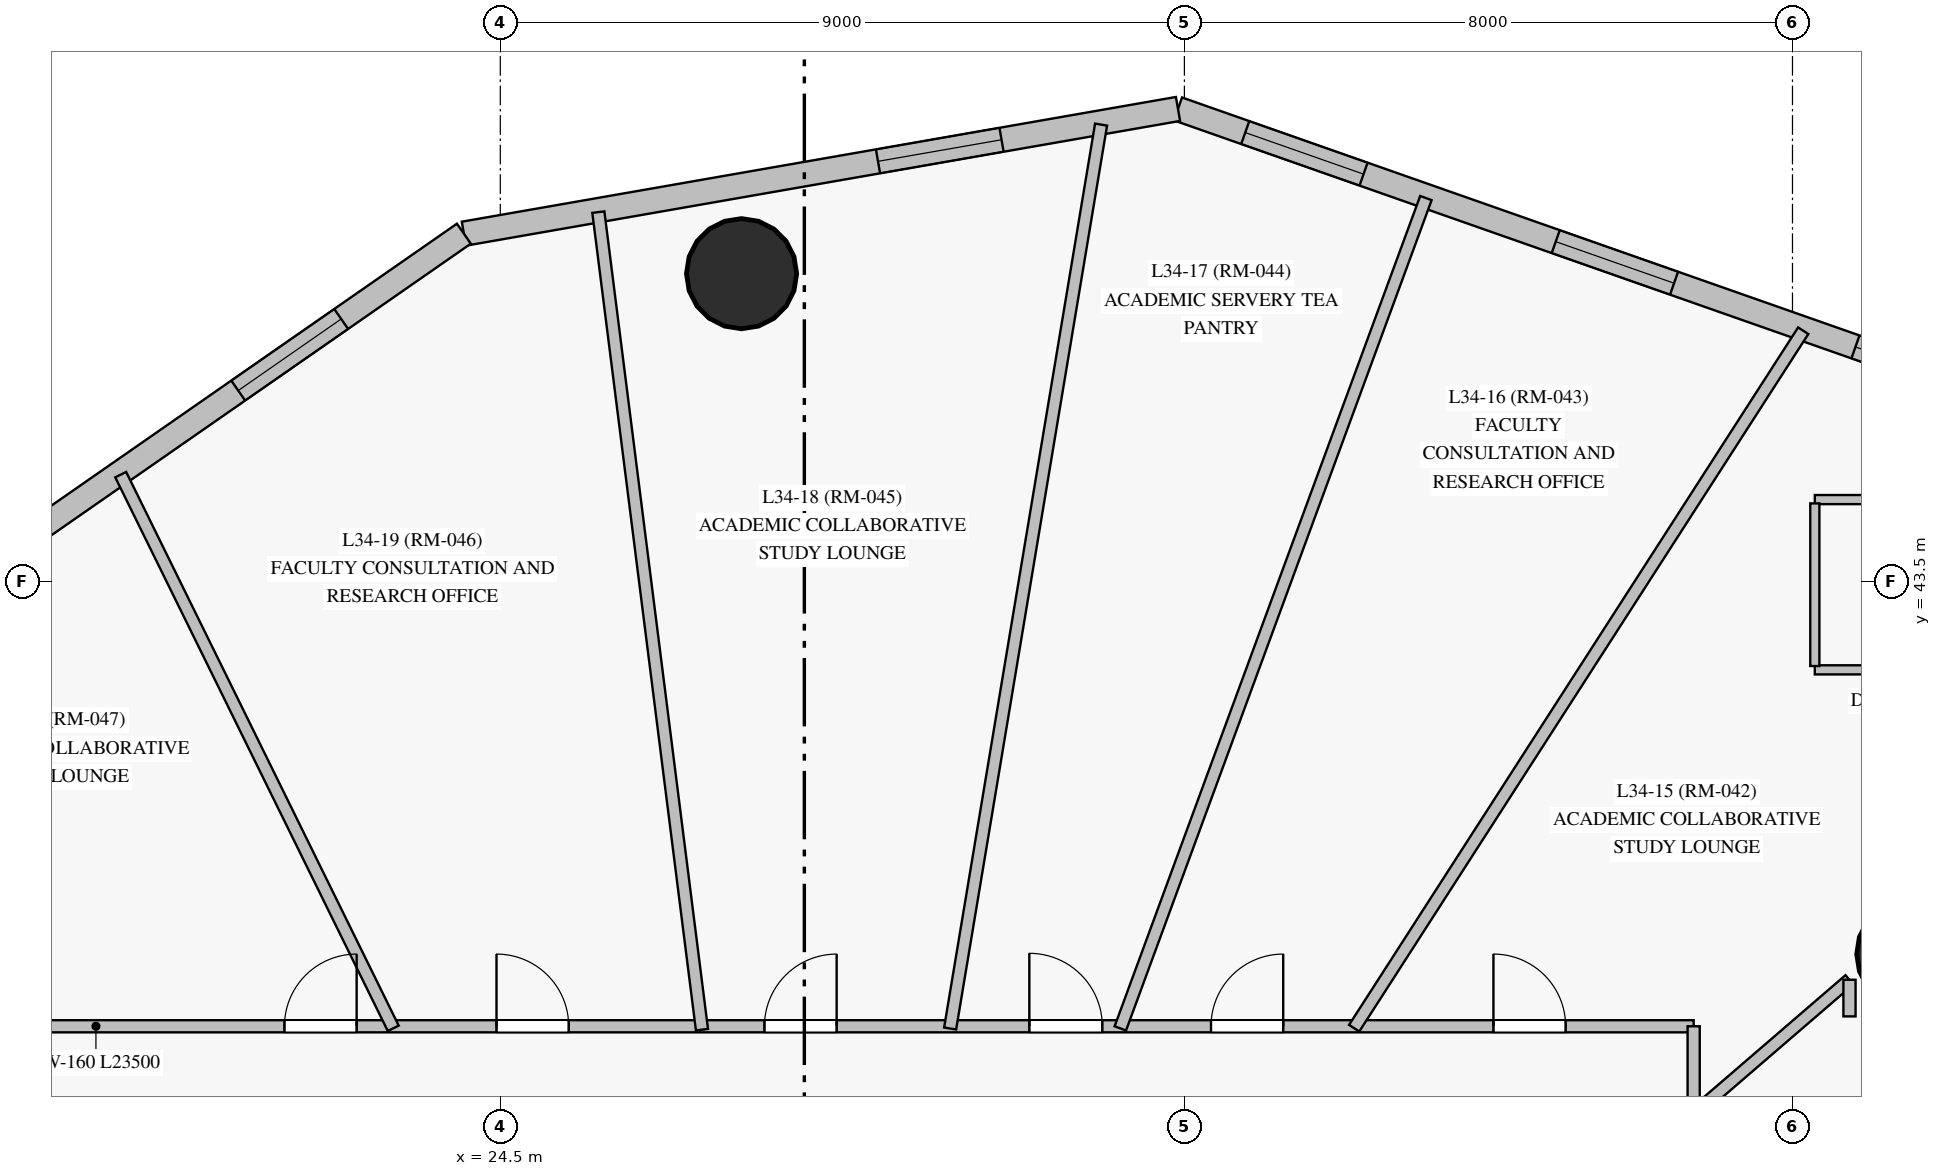
"""IFC4 building model, lengths in metres.
Left out: names, types, materials, properties, quantities, classifications, styles, units other than length and angle.
Written with IfcOpenShell. Run it as: python <this file> out.ifc"""

import sys

from ifc_helpers import new_model, si_unit, direction, frame, frame_2d, origin, origin_with_axes, origin_2d, place, context, subcontext, project, spatial, rectangle, circle, extrude, source, transform, mapped, element, fill, save


model = new_model("IFC4")
c1 = context("Model", 3, precision=1e-05, world=origin(), true_north=direction((0.0, 1.0)))
c2 = subcontext(c1, "Body", "Model", "MODEL_VIEW")
j1 = project(units=[si_unit("LENGTHUNIT", "METRE"), si_unit("PLANEANGLEUNIT", "RADIAN")], contexts=[c1])
p1 = place(None, origin())
s1 = spatial("IfcSite", under=j1, at=p1, CompositionType="ELEMENT")
p2 = place(p1, origin())
s2 = spatial("IfcBuilding", under=s1, at=p2, CompositionType="ELEMENT")
p3 = place(p2, frame((0.0, 0.0, 123.65)))
s3 = spatial("IfcBuildingStorey", under=s2, at=p3, CompositionType="ELEMENT", Elevation=123.65)
m1 = source(origin_with_axes(), c2, "Body", "SweptSolid", [
    extrude(circle(Radius=0.725, at=origin_2d()), origin(), (0.0, 0.0, 1.0), 3.05),
])
for number, where, z_axis, x_axis in (
    (1, (43.07, 38.6, 0.0), (0.0, 0.0, 1.0), (1.0, 0.0, 0.0)),
    (2, (27.674, 47.551, 0.0), (0.0, 0.0, 1.0), (1.0, 0.0, 0.0)),
):
    element("IfcColumn", number, at=place(p3, frame(where, z_axis=z_axis, x_axis=x_axis)), inside=s3, PredefinedType="COLUMN", context=c2, shape_type="MappedRepresentation", body=[
        mapped(m1, transform((0.0, 0.0, 0.0), scale=1.0)),
    ])
p4 = place(p3, frame((44.628, 45.78, 0.0), z_axis=(0.0, 0.0, 1.0), x_axis=(-0.943484621609, 0.331416307366, 0.0)))
e3 = element("IfcWall", 3, at=p4, inside=s3, PredefinedType="SOLIDWALL", context=c2, shape_type="SweptSolid", body=[
    extrude(rectangle(XDim=11.884, YDim=0.32, at=frame_2d((5.942, 0.0))), origin(), (0.0, 0.0, 1.0), 2.825),
])
p5 = place(p4, frame((0.787, 0.0, 0.85)))
e4 = element("IfcOpeningElement", 4, at=p5, cuts=e3, PredefinedType="OPENING", context=c2, shape_type="SweptSolid", body=[
    extrude(rectangle(XDim=1.65, YDim=1.65, at=frame_2d((0.825, 0.825))), frame((0.0, 0.17, 0.0), z_axis=(0.0, -1.0, 0.0), x_axis=(1.0, 0.0, 0.0)), (0.0, 0.0, 1.0), 0.34),
])
p6 = place(p4, frame((4.966, 0.0, 0.85)))
e5 = element("IfcOpeningElement", 5, at=p6, cuts=e3, PredefinedType="OPENING", context=c2, shape_type="SweptSolid", body=[
    extrude(rectangle(XDim=1.65, YDim=1.65, at=frame_2d((0.825, 0.825))), frame((0.0, 0.17, 0.0), z_axis=(0.0, -1.0, 0.0), x_axis=(1.0, 0.0, 0.0)), (0.0, 0.0, 1.0), 0.34),
])
p7 = place(p4, frame((9.296, 0.0, 0.85)))
e6 = element("IfcOpeningElement", 6, at=p7, cuts=e3, PredefinedType="OPENING", context=c2, shape_type="SweptSolid", body=[
    extrude(rectangle(XDim=1.65, YDim=1.65, at=frame_2d((0.825, 0.825))), frame((0.0, 0.17, 0.0), z_axis=(0.0, -1.0, 0.0), x_axis=(1.0, 0.0, 0.0)), (0.0, 0.0, 1.0), 0.34),
])
p8 = place(p3, frame((33.416, 49.718, 0.0), z_axis=(0.0, 0.0, 1.0), x_axis=(-0.985088439162, -0.172048734463, 0.0)))
e7 = element("IfcWall", 7, at=p8, inside=s3, PredefinedType="SOLIDWALL", context=c2, shape_type="SweptSolid", body=[
    extrude(rectangle(XDim=9.537, YDim=0.32, at=frame_2d((4.769, 0.0))), origin(), (0.0, 0.0, 1.0), 2.825),
])
p9 = place(p8, frame((2.356, 0.0, 0.85)))
e8 = element("IfcOpeningElement", 8, at=p9, cuts=e7, PredefinedType="OPENING", context=c2, shape_type="SweptSolid", body=[
    extrude(rectangle(XDim=1.65, YDim=1.65, at=frame_2d((0.825, 0.825))), frame((0.0, 0.17, 0.0), z_axis=(0.0, -1.0, 0.0), x_axis=(1.0, 0.0, 0.0)), (0.0, 0.0, 1.0), 0.34),
])
p10 = place(p3, frame((24.021, 48.077, 0.0), z_axis=(0.0, 0.0, 1.0), x_axis=(-0.821066763307, -0.570832173404, 0.0)))
e9 = element("IfcWall", 9, at=p10, inside=s3, PredefinedType="SOLIDWALL", context=c2, shape_type="SweptSolid", body=[
    extrude(rectangle(XDim=13.796, YDim=0.32, at=frame_2d((6.898, 0.0))), origin(), (0.0, 0.0, 1.0), 2.825),
])
p11 = place(p10, frame((1.966, 0.0, 0.85)))
e10 = element("IfcOpeningElement", 10, at=p11, cuts=e9, PredefinedType="OPENING", context=c2, shape_type="SweptSolid", body=[
    extrude(rectangle(XDim=1.65, YDim=1.65, at=frame_2d((0.825, 0.825))), frame((0.0, 0.17, 0.0), z_axis=(0.0, -1.0, 0.0), x_axis=(1.0, 0.0, 0.0)), (0.0, 0.0, 1.0), 0.34),
])
p12 = place(p10, frame((6.91, 0.0, 0.85)))
e11 = element("IfcOpeningElement", 11, at=p12, cuts=e9, PredefinedType="OPENING", context=c2, shape_type="SweptSolid", body=[
    extrude(rectangle(XDim=1.65, YDim=1.65, at=frame_2d((0.825, 0.825))), frame((0.0, 0.17, 0.0), z_axis=(0.0, -1.0, 0.0), x_axis=(1.0, 0.0, 0.0)), (0.0, 0.0, 1.0), 0.34),
])
p13 = place(p10, frame((10.697, 0.0, 0.85)))
e12 = element("IfcOpeningElement", 12, at=p13, cuts=e9, PredefinedType="OPENING", context=c2, shape_type="SweptSolid", body=[
    extrude(rectangle(XDim=1.65, YDim=1.65, at=frame_2d((0.825, 0.825))), frame((0.0, 0.17, 0.0), z_axis=(0.0, -1.0, 0.0), x_axis=(1.0, 0.0, 0.0)), (0.0, 0.0, 1.0), 0.34),
])
p14 = place(p3, frame((16.7, 37.65, 0.0), z_axis=(0.0, 0.0, 1.0), x_axis=(1.0, 0.0, 0.0)))
e13 = element("IfcWall", 13, at=p14, inside=s3, PredefinedType="PARTITIONING", context=c2, shape_type="SweptSolid", body=[
    extrude(rectangle(XDim=23.5, YDim=0.16, at=frame_2d((11.75, 0.0))), origin(), (0.0, 0.0, 1.0), 2.325),
])
p15 = place(p14, frame((20.866, 0.0, 0.0)))
e14 = element("IfcOpeningElement", 14, at=p15, cuts=e13, PredefinedType="OPENING", context=c2, shape_type="SweptSolid", body=[
    extrude(rectangle(XDim=0.95, YDim=2.15, at=frame_2d((0.475, 1.075))), frame((0.0, 0.09, 0.0), z_axis=(0.0, -1.0, 0.0), x_axis=(1.0, 0.0, 0.0)), (0.0, 0.0, 1.0), 0.18),
])
p16 = place(p14, frame((17.15, 0.0, 0.0)))
e15 = element("IfcOpeningElement", 15, at=p16, cuts=e13, PredefinedType="OPENING", context=c2, shape_type="SweptSolid", body=[
    extrude(rectangle(XDim=0.95, YDim=2.15, at=frame_2d((0.475, 1.075))), frame((0.0, 0.09, 0.0), z_axis=(0.0, -1.0, 0.0), x_axis=(1.0, 0.0, 0.0)), (0.0, 0.0, 1.0), 0.18),
])
p17 = place(p14, frame((14.76, 0.0, 0.0)))
e16 = element("IfcOpeningElement", 16, at=p17, cuts=e13, PredefinedType="OPENING", context=c2, shape_type="SweptSolid", body=[
    extrude(rectangle(XDim=0.96, YDim=2.15, at=frame_2d((0.48, 1.075))), frame((0.0, 0.09, 0.0), z_axis=(0.0, -1.0, 0.0), x_axis=(1.0, 0.0, 0.0)), (0.0, 0.0, 1.0), 0.18),
])
p18 = place(p14, frame((11.275, 0.0, 0.0)))
e17 = element("IfcOpeningElement", 17, at=p18, cuts=e13, PredefinedType="OPENING", context=c2, shape_type="SweptSolid", body=[
    extrude(rectangle(XDim=0.95, YDim=2.15, at=frame_2d((0.475, 1.075))), frame((0.0, 0.09, 0.0), z_axis=(0.0, -1.0, 0.0), x_axis=(1.0, 0.0, 0.0)), (0.0, 0.0, 1.0), 0.18),
])
p19 = place(p14, frame((7.75, 0.0, 0.0)))
e18 = element("IfcOpeningElement", 18, at=p19, cuts=e13, PredefinedType="OPENING", context=c2, shape_type="SweptSolid", body=[
    extrude(rectangle(XDim=0.95, YDim=2.15, at=frame_2d((0.475, 1.075))), frame((0.0, 0.09, 0.0), z_axis=(0.0, -1.0, 0.0), x_axis=(1.0, 0.0, 0.0)), (0.0, 0.0, 1.0), 0.18),
])
p20 = place(p14, frame((4.96, 0.0, 0.0)))
e19 = element("IfcOpeningElement", 19, at=p20, cuts=e13, PredefinedType="OPENING", context=c2, shape_type="SweptSolid", body=[
    extrude(rectangle(XDim=0.95, YDim=2.15, at=frame_2d((0.475, 1.075))), frame((0.0, 0.09, 0.0), z_axis=(0.0, -1.0, 0.0), x_axis=(1.0, 0.0, 0.0)), (0.0, 0.0, 1.0), 0.18),
])
p21 = place(p3, frame((40.2, 37.65, 0.0), z_axis=(0.0, 0.0, 1.0), x_axis=(0.0, -1.0, 0.0)))
e20 = element("IfcWall", 20, at=p21, inside=s3, PredefinedType="PARTITIONING", context=c2, shape_type="SweptSolid", body=[
    extrude(rectangle(XDim=22.3, YDim=0.16, at=frame_2d((11.15, 0.0))), origin(), (0.0, 0.0, 1.0), 2.325),
])
p22 = place(p21, frame((14.02, 0.0, 0.0)))
e21 = element("IfcOpeningElement", 21, at=p22, cuts=e20, PredefinedType="OPENING", context=c2, shape_type="SweptSolid", body=[
    extrude(rectangle(XDim=0.96, YDim=2.15, at=frame_2d((0.48, 1.075))), frame((0.0, 0.09, 0.0), z_axis=(0.0, -1.0, 0.0), x_axis=(1.0, 0.0, 0.0)), (0.0, 0.0, 1.0), 0.18),
])
p23 = place(p21, frame((10.675, 0.0, 0.0)))
e22 = element("IfcOpeningElement", 22, at=p23, cuts=e20, PredefinedType="OPENING", context=c2, shape_type="SweptSolid", body=[
    extrude(rectangle(XDim=0.96, YDim=2.15, at=frame_2d((0.48, 1.075))), frame((0.0, 0.09, 0.0), z_axis=(0.0, -1.0, 0.0), x_axis=(1.0, 0.0, 0.0)), (0.0, 0.0, 1.0), 0.18),
])
p24 = place(p21, frame((7.33, 0.0, 0.0)))
e23 = element("IfcOpeningElement", 23, at=p24, cuts=e20, PredefinedType="OPENING", context=c2, shape_type="SweptSolid", body=[
    extrude(rectangle(XDim=0.95, YDim=2.15, at=frame_2d((0.475, 1.075))), frame((0.0, 0.09, 0.0), z_axis=(0.0, -1.0, 0.0), x_axis=(1.0, 0.0, 0.0)), (0.0, 0.0, 1.0), 0.18),
])
p25 = place(p21, frame((4.91, 0.0, 0.0)))
e24 = element("IfcOpeningElement", 24, at=p25, cuts=e20, PredefinedType="OPENING", context=c2, shape_type="SweptSolid", body=[
    extrude(rectangle(XDim=0.95, YDim=2.15, at=frame_2d((0.475, 1.075))), frame((0.0, 0.09, 0.0), z_axis=(0.0, -1.0, 0.0), x_axis=(1.0, 0.0, 0.0)), (0.0, 0.0, 1.0), 0.18),
])
p26 = place(p3, frame((30.418, 37.62, 0.0), z_axis=(0.0, 0.0, 1.0), x_axis=(0.164710933683, 0.98634188207, 0.0)))
e25 = element("IfcWall", 25, at=p26, inside=s3, PredefinedType="PARTITIONING", context=c2, shape_type="SweptSolid", body=[
    extrude(rectangle(XDim=12.056, YDim=0.16, at=frame_2d((6.028, 0.0))), origin(), (0.0, 0.0, 1.0), 2.825),
])
p27 = place(p3, frame((32.657, 37.622, 0.0), z_axis=(0.0, 0.0, 1.0), x_axis=(0.345391402171, 0.938458725414, 0.0)))
e26 = element("IfcWall", 26, at=p27, inside=s3, PredefinedType="PARTITIONING", context=c2, shape_type="SweptSolid", body=[
    extrude(rectangle(XDim=11.64, YDim=0.16, at=frame_2d((5.82, 0.0))), origin(), (0.0, 0.0, 1.0), 2.825),
])
p28 = place(p3, frame((35.734, 37.625, 0.0), z_axis=(0.0, 0.0, 1.0), x_axis=(0.54132507633, 0.840813392933, 0.0)))
e27 = element("IfcWall", 27, at=p28, inside=s3, PredefinedType="PARTITIONING", context=c2, shape_type="SweptSolid", body=[
    extrude(rectangle(XDim=10.913, YDim=0.16, at=frame_2d((5.457, 0.0))), origin(), (0.0, 0.0, 1.0), 2.825),
])
p29 = place(p3, frame((27.153, 37.605, 0.0), z_axis=(0.0, 0.0, 1.0), x_axis=(-0.125744588112, 0.992062648506, 0.0)))
e28 = element("IfcWall", 28, at=p29, inside=s3, PredefinedType="PARTITIONING", context=c2, shape_type="SweptSolid", body=[
    extrude(rectangle(XDim=10.842, YDim=0.16, at=frame_2d((5.421, 0.0))), origin(), (0.0, 0.0, 1.0), 2.225),
])
p30 = place(p3, frame((23.092, 37.623, 0.0), z_axis=(0.0, 0.0, 1.0), x_axis=(-0.441623698669, 0.897200372701, 0.0)))
e29 = element("IfcWall", 29, at=p30, inside=s3, PredefinedType="PARTITIONING", context=c2, shape_type="SweptSolid", body=[
    extrude(rectangle(XDim=8.119, YDim=0.16, at=frame_2d((4.06, 0.0))), origin(), (0.0, 0.0, 1.0), 2.825),
])
p31 = place(p3, frame((40.177, 36.477, 0.0), z_axis=(0.0, 0.0, 1.0), x_axis=(0.757761446907, 0.652531677071, 0.0)))
e30 = element("IfcWall", 30, at=p31, inside=s3, PredefinedType="PARTITIONING", context=c2, shape_type="SweptSolid", body=[
    extrude(rectangle(XDim=2.735, YDim=0.16, at=frame_2d((1.368, 0.0))), origin(), (0.0, 0.0, 1.0), 2.225),
])
p32 = place(p3, frame((41.794, 42.339, 0.0), z_axis=(0.0, 0.0, 1.0), x_axis=(1.0, 0.0, 0.0)))
e31 = element("IfcWall", 31, at=p32, inside=s3, PredefinedType="PARTITIONING", context=c2, shape_type="SweptSolid", body=[
    extrude(rectangle(XDim=2.36, YDim=0.12, at=frame_2d((1.18, 0.0))), origin(), (0.0, 0.0, 1.0), 2.825),
])
p33 = place(p32, frame((0.75, 0.0, 0.0)))
e32 = element("IfcOpeningElement", 32, at=p33, cuts=e31, PredefinedType="OPENING", context=c2, shape_type="SweptSolid", body=[
    extrude(rectangle(XDim=0.86, YDim=2.1, at=frame_2d((0.43, 1.05))), frame((0.0, 0.07, 0.0), z_axis=(0.0, -1.0, 0.0), x_axis=(1.0, 0.0, 0.0)), (0.0, 0.0, 1.0), 0.14),
])
p34 = place(p3, frame((44.154, 44.579, 0.0), z_axis=(0.0, 0.0, 1.0), x_axis=(-1.0, 0.0, 0.0)))
e33 = element("IfcWall", 33, at=p34, inside=s3, PredefinedType="PARTITIONING", context=c2, shape_type="SweptSolid", body=[
    extrude(rectangle(XDim=2.36, YDim=0.12, at=frame_2d((1.18, 0.0))), origin(), (0.0, 0.0, 1.0), 2.825),
])
p35 = place(p3, frame((41.794, 44.529, 0.0), z_axis=(0.0, 0.0, 1.0), x_axis=(0.0, -1.0, 0.0)))
e34 = element("IfcWall", 34, at=p35, inside=s3, PredefinedType="PARTITIONING", context=c2, shape_type="SweptSolid", body=[
    extrude(rectangle(XDim=2.14, YDim=0.12, at=frame_2d((1.07, 0.0))), origin(), (0.0, 0.0, 1.0), 2.825),
])
p36 = place(p3, frame((42.25, 38.262, 0.0), z_axis=(0.0, 0.0, 1.0), x_axis=(0.0, -1.0, 0.0)))
e35 = element("IfcWall", 35, at=p36, inside=s3, PredefinedType="PARTITIONING", context=c2, shape_type="SweptSolid", body=[
    extrude(rectangle(XDim=0.482, YDim=0.16, at=frame_2d((0.241, 0.0))), origin(), (0.0, 0.0, 1.0), 2.325),
])
m2 = source(origin_with_axes(), c2, "Body", "SweptSolid", [
    extrude(rectangle(XDim=1.65, YDim=1.65, at=frame_2d((0.825, 0.825))), frame((0.0, 0.03, 0.0), z_axis=(0.0, -1.0, 0.0), x_axis=(1.0, 0.0, 0.0)), (0.0, 0.0, 1.0), 0.06),
])
p37 = place(p5, origin())
e36 = element("IfcWindow", 36, at=p37, inside=s3, PartitioningType="SINGLE_PANEL", PredefinedType="WINDOW", context=c2, shape_type="MappedRepresentation", body=[
    mapped(m2, transform((0.0, 0.0, 0.0), scale=1.0)),
])
fill(e4, e36)
p38 = place(p6, origin())
e37 = element("IfcWindow", 37, at=p38, inside=s3, PartitioningType="SINGLE_PANEL", PredefinedType="WINDOW", context=c2, shape_type="MappedRepresentation", body=[
    mapped(m2, transform((0.0, 0.0, 0.0), scale=1.0)),
])
fill(e5, e37)
p39 = place(p7, origin())
e38 = element("IfcWindow", 38, at=p39, inside=s3, PartitioningType="SINGLE_PANEL", PredefinedType="WINDOW", context=c2, shape_type="MappedRepresentation", body=[
    mapped(m2, transform((0.0, 0.0, 0.0), scale=1.0)),
])
fill(e6, e38)
p40 = place(p9, origin())
e39 = element("IfcWindow", 39, at=p40, inside=s3, PartitioningType="SINGLE_PANEL", PredefinedType="WINDOW", context=c2, shape_type="MappedRepresentation", body=[
    mapped(m2, transform((0.0, 0.0, 0.0), scale=1.0)),
])
fill(e8, e39)
p41 = place(p11, origin())
e40 = element("IfcWindow", 40, at=p41, inside=s3, PartitioningType="SINGLE_PANEL", PredefinedType="WINDOW", context=c2, shape_type="MappedRepresentation", body=[
    mapped(m2, transform((0.0, 0.0, 0.0), scale=1.0)),
])
fill(e10, e40)
m3 = source(origin_with_axes(), c2, "Body", "SweptSolid", [
    extrude(rectangle(XDim=0.95, YDim=2.15, at=frame_2d((0.475, 1.075))), frame((0.0, 0.025, 0.0), z_axis=(0.0, -1.0, 0.0), x_axis=(1.0, 0.0, 0.0)), (0.0, 0.0, 1.0), 0.05),
])
p42 = place(p15, origin())
e41 = element("IfcDoor", 41, at=p42, inside=s3, OperationType="SINGLE_SWING_LEFT", PredefinedType="DOOR", context=c2, shape_type="MappedRepresentation", body=[
    mapped(m3, transform((0.0, 0.0, 0.0), scale=1.0)),
])
fill(e14, e41)
p43 = place(p16, origin())
e42 = element("IfcDoor", 42, at=p43, inside=s3, OperationType="SINGLE_SWING_RIGHT", PredefinedType="DOOR", context=c2, shape_type="MappedRepresentation", body=[
    mapped(m3, transform((0.0, 0.0, 0.0), scale=1.0)),
])
fill(e15, e42)
m4 = source(origin_with_axes(), c2, "Body", "SweptSolid", [
    extrude(rectangle(XDim=0.96, YDim=2.15, at=frame_2d((0.48, 1.075))), frame((0.0, 0.025, 0.0), z_axis=(0.0, -1.0, 0.0), x_axis=(1.0, 0.0, 0.0)), (0.0, 0.0, 1.0), 0.05),
])
p44 = place(p17, origin())
e43 = element("IfcDoor", 43, at=p44, inside=s3, OperationType="SINGLE_SWING_LEFT", PredefinedType="DOOR", context=c2, shape_type="MappedRepresentation", body=[
    mapped(m4, transform((0.0, 0.0, 0.0), scale=1.0)),
])
fill(e16, e43)
p45 = place(p18, origin())
e44 = element("IfcDoor", 44, at=p45, inside=s3, OperationType="SINGLE_SWING_RIGHT", PredefinedType="DOOR", context=c2, shape_type="MappedRepresentation", body=[
    mapped(m3, transform((0.0, 0.0, 0.0), scale=1.0)),
])
fill(e17, e44)
p46 = place(p19, origin())
e45 = element("IfcDoor", 45, at=p46, inside=s3, OperationType="SINGLE_SWING_LEFT", PredefinedType="DOOR", context=c2, shape_type="MappedRepresentation", body=[
    mapped(m3, transform((0.0, 0.0, 0.0), scale=1.0)),
])
fill(e18, e45)
p47 = place(p20, origin())
e46 = element("IfcDoor", 46, at=p47, inside=s3, OperationType="SINGLE_SWING_RIGHT", PredefinedType="DOOR", context=c2, shape_type="MappedRepresentation", body=[
    mapped(m3, transform((0.0, 0.0, 0.0), scale=1.0)),
])
fill(e19, e46)
save(model, sys.argv[1])
